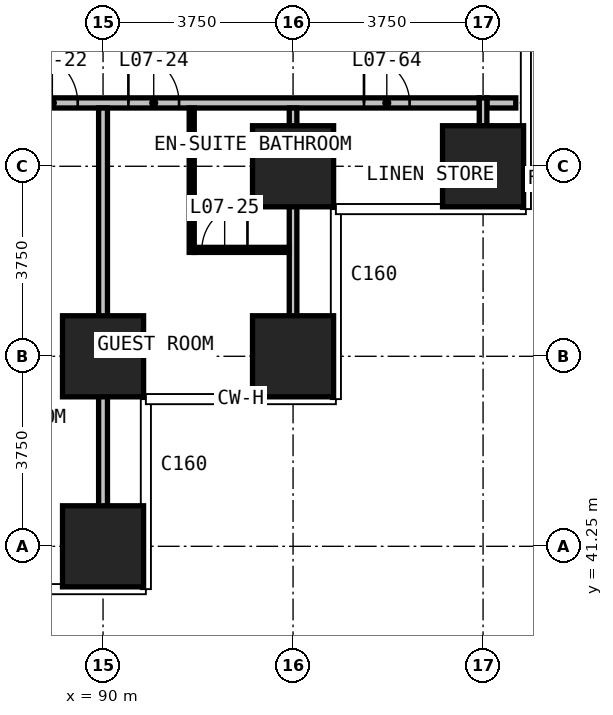
"""IFC4 building model, lengths in metres.
Left out: names, types, materials, properties, quantities, classifications, styles, units other than length and angle.
Written with IfcOpenShell. Run it as: python <this file> out.ifc"""

import sys

from ifc_helpers import new_model, si_unit, direction, frame, frame_2d, origin, origin_2d, place, context, subcontext, project, spatial, rectangle, extrude, element, fill, save


model = new_model("IFC4")
c1 = context("Model", 3, precision=1e-05, world=origin(), true_north=direction((0.0, 1.0)))
c2 = subcontext(c1, "Body", "Model", "MODEL_VIEW")
j1 = project(units=[si_unit("LENGTHUNIT", "METRE"), si_unit("PLANEANGLEUNIT", "RADIAN")], contexts=[c1])
p1 = place(None, origin())
s1 = spatial("IfcSite", under=j1, at=p1, CompositionType="ELEMENT")
p2 = place(p1, origin())
s2 = spatial("IfcBuilding", under=s1, at=p2, CompositionType="ELEMENT")
p3 = place(p2, frame((0.0, 0.0, 42.8)))
s3 = spatial("IfcBuildingStorey", under=s2, at=p3, CompositionType="ELEMENT", Elevation=42.8)
for number, where, z_axis, x_axis in (
    (1, (90.0, 41.25, 0.0), (0.0, 0.0, 1.0), (1.0, 0.0, 0.0)),
    (2, (90.0, 45.0, 0.0), (0.0, 0.0, 1.0), (1.0, 0.0, 0.0)),
    (3, (93.75, 45.0, 0.0), (0.0, 0.0, 1.0), (1.0, 0.0, 0.0)),
    (4, (93.75, 48.75, 0.0), (0.0, 0.0, 1.0), (1.0, 0.0, 0.0)),
    (5, (97.5, 48.75, 0.0), (0.0, 0.0, 1.0), (1.0, 0.0, 0.0)),
):
    element("IfcColumn", number, at=place(p3, frame(where, z_axis=z_axis, x_axis=x_axis)), inside=s3, PredefinedType="COLUMN", context=c2, shape_type="SweptSolid", body=[
        extrude(rectangle(XDim=1.6, YDim=1.6, at=origin_2d()), origin(), (0.0, 0.0, 1.0), 3.3),
    ])
p4 = place(p3, frame((52.575, 50.0, 0.0), z_axis=(0.0, 0.0, 1.0), x_axis=(1.0, 0.0, 0.0)))
e6 = element("IfcWall", 6, at=p4, inside=s3, PredefinedType="PARTITIONING", context=c2, shape_type="SweptSolid", body=[
    extrude(rectangle(XDim=44.85, YDim=0.2, at=frame_2d((22.425, 0.0))), origin(), (0.0, 0.0, 1.0), 3.0),
])
p5 = place(p4, frame((5.925, 0.0, 0.0)))
e7 = element("IfcOpeningElement", 7, at=p5, cuts=e6, PredefinedType="OPENING", context=c2, shape_type="SweptSolid", body=[
    extrude(rectangle(XDim=1.0, YDim=2.2, at=frame_2d((0.5, 1.1))), frame((0.0, 0.11, 0.0), z_axis=(0.0, -1.0, 0.0), x_axis=(1.0, 0.0, 0.0)), (0.0, 0.0, 1.0), 0.22),
])
p6 = place(p4, frame((7.925, 0.0, 0.0)))
e8 = element("IfcOpeningElement", 8, at=p6, cuts=e6, PredefinedType="OPENING", context=c2, shape_type="SweptSolid", body=[
    extrude(rectangle(XDim=1.0, YDim=2.2, at=frame_2d((0.5, 1.1))), frame((0.0, 0.11, 0.0), z_axis=(0.0, -1.0, 0.0), x_axis=(1.0, 0.0, 0.0)), (0.0, 0.0, 1.0), 0.22),
])
p7 = place(p4, frame((13.425, 0.0, 0.0)))
e9 = element("IfcOpeningElement", 9, at=p7, cuts=e6, PredefinedType="OPENING", context=c2, shape_type="SweptSolid", body=[
    extrude(rectangle(XDim=1.0, YDim=2.2, at=frame_2d((0.5, 1.1))), frame((0.0, 0.11, 0.0), z_axis=(0.0, -1.0, 0.0), x_axis=(1.0, 0.0, 0.0)), (0.0, 0.0, 1.0), 0.22),
])
p8 = place(p4, frame((15.425, 0.0, 0.0)))
e10 = element("IfcOpeningElement", 10, at=p8, cuts=e6, PredefinedType="OPENING", context=c2, shape_type="SweptSolid", body=[
    extrude(rectangle(XDim=1.0, YDim=2.2, at=frame_2d((0.5, 1.1))), frame((0.0, 0.11, 0.0), z_axis=(0.0, -1.0, 0.0), x_axis=(1.0, 0.0, 0.0)), (0.0, 0.0, 1.0), 0.22),
])
p9 = place(p4, frame((20.925, 0.0, 0.0)))
e11 = element("IfcOpeningElement", 11, at=p9, cuts=e6, PredefinedType="OPENING", context=c2, shape_type="SweptSolid", body=[
    extrude(rectangle(XDim=1.0, YDim=2.2, at=frame_2d((0.5, 1.1))), frame((0.0, 0.11, 0.0), z_axis=(0.0, -1.0, 0.0), x_axis=(1.0, 0.0, 0.0)), (0.0, 0.0, 1.0), 0.22),
])
p10 = place(p4, frame((22.925, 0.0, 0.0)))
e12 = element("IfcOpeningElement", 12, at=p10, cuts=e6, PredefinedType="OPENING", context=c2, shape_type="SweptSolid", body=[
    extrude(rectangle(XDim=1.0, YDim=2.2, at=frame_2d((0.5, 1.1))), frame((0.0, 0.11, 0.0), z_axis=(0.0, -1.0, 0.0), x_axis=(1.0, 0.0, 0.0)), (0.0, 0.0, 1.0), 0.22),
])
p11 = place(p4, frame((28.425, 0.0, 0.0)))
e13 = element("IfcOpeningElement", 13, at=p11, cuts=e6, PredefinedType="OPENING", context=c2, shape_type="SweptSolid", body=[
    extrude(rectangle(XDim=1.0, YDim=2.2, at=frame_2d((0.5, 1.1))), frame((0.0, 0.11, 0.0), z_axis=(0.0, -1.0, 0.0), x_axis=(1.0, 0.0, 0.0)), (0.0, 0.0, 1.0), 0.22),
])
p12 = place(p4, frame((30.425, 0.0, 0.0)))
e14 = element("IfcOpeningElement", 14, at=p12, cuts=e6, PredefinedType="OPENING", context=c2, shape_type="SweptSolid", body=[
    extrude(rectangle(XDim=1.0, YDim=2.2, at=frame_2d((0.5, 1.1))), frame((0.0, 0.11, 0.0), z_axis=(0.0, -1.0, 0.0), x_axis=(1.0, 0.0, 0.0)), (0.0, 0.0, 1.0), 0.22),
])
p13 = place(p4, frame((35.925, 0.0, 0.0)))
e15 = element("IfcOpeningElement", 15, at=p13, cuts=e6, PredefinedType="OPENING", context=c2, shape_type="SweptSolid", body=[
    extrude(rectangle(XDim=1.0, YDim=2.2, at=frame_2d((0.5, 1.1))), frame((0.0, 0.11, 0.0), z_axis=(0.0, -1.0, 0.0), x_axis=(1.0, 0.0, 0.0)), (0.0, 0.0, 1.0), 0.22),
])
p14 = place(p4, frame((37.925, 0.0, 0.0)))
e16 = element("IfcOpeningElement", 16, at=p14, cuts=e6, PredefinedType="OPENING", context=c2, shape_type="SweptSolid", body=[
    extrude(rectangle(XDim=1.0, YDim=2.2, at=frame_2d((0.5, 1.1))), frame((0.0, 0.11, 0.0), z_axis=(0.0, -1.0, 0.0), x_axis=(1.0, 0.0, 0.0)), (0.0, 0.0, 1.0), 0.22),
])
p15 = place(p4, frame((1.4, 0.0, 0.0)))
e17 = element("IfcOpeningElement", 17, at=p15, cuts=e6, PredefinedType="OPENING", context=c2, shape_type="SweptSolid", body=[
    extrude(rectangle(XDim=0.9, YDim=2.2, at=frame_2d((0.45, 1.1))), frame((0.0, 0.11, 0.0), z_axis=(0.0, -1.0, 0.0), x_axis=(1.0, 0.0, 0.0)), (0.0, 0.0, 1.0), 0.22),
])
p16 = place(p4, frame((42.575, 0.0, 0.0)))
e18 = element("IfcOpeningElement", 18, at=p16, cuts=e6, PredefinedType="OPENING", context=c2, shape_type="SweptSolid", body=[
    extrude(rectangle(XDim=0.9, YDim=2.2, at=frame_2d((0.45, 1.1))), frame((0.0, 0.11, 0.0), z_axis=(0.0, -1.0, 0.0), x_axis=(1.0, 0.0, 0.0)), (0.0, 0.0, 1.0), 0.22),
])
p17 = place(p3, frame((97.575, 50.0, 0.0), z_axis=(0.0, 0.0, 1.0), x_axis=(1.0, 0.0, 0.0)))
e19 = element("IfcWall", 19, at=p17, inside=s3, PredefinedType="PARTITIONING", context=c2, shape_type="SweptSolid", body=[
    extrude(rectangle(XDim=0.57, YDim=0.2, at=frame_2d((0.285, 0.0))), origin(), (0.0, 0.0, 1.0), 3.0),
])
p18 = place(p3, frame((90.0, 40.485, 0.0), z_axis=(0.0, 0.0, 1.0), x_axis=(0.0, 1.0, 0.0)))
e20 = element("IfcWall", 20, at=p18, inside=s3, PredefinedType="PARTITIONING", context=c2, shape_type="SweptSolid", body=[
    extrude(rectangle(XDim=9.415, YDim=0.175, at=frame_2d((4.708, 0.0))), origin(), (0.0, 0.0, 1.0), 3.0),
])
p19 = place(p3, frame((93.75, 44.235, 0.0), z_axis=(0.0, 0.0, 1.0), x_axis=(0.0, 1.0, 0.0)))
e21 = element("IfcWall", 21, at=p19, inside=s3, PredefinedType="PARTITIONING", context=c2, shape_type="SweptSolid", body=[
    extrude(rectangle(XDim=5.665, YDim=0.15, at=frame_2d((2.833, 0.0))), origin(), (0.0, 0.0, 1.0), 3.0),
])
p20 = place(p3, frame((97.5, 48.105, 0.0), z_axis=(0.0, 0.0, 1.0), x_axis=(0.0, 1.0, 0.0)))
e22 = element("IfcWall", 22, at=p20, inside=s3, PredefinedType="PARTITIONING", context=c2, shape_type="SweptSolid", body=[
    extrude(rectangle(XDim=1.995, YDim=0.15, at=frame_2d((0.998, 0.0))), origin(), (0.0, 0.0, 1.0), 3.0),
])
p21 = place(p3, frame((91.8, 47.1, 0.0), z_axis=(0.0, 0.0, 1.0), x_axis=(1.0, 0.0, 0.0)))
e23 = element("IfcWall", 23, at=p21, inside=s3, PredefinedType="PARTITIONING", context=c2, shape_type="SweptSolid", body=[
    extrude(rectangle(XDim=1.875, YDim=0.1, at=frame_2d((0.938, 0.0))), origin(), (0.0, 0.0, 1.0), 3.0),
])
p22 = place(p21, frame((0.15, 0.0, 0.0)))
e24 = element("IfcOpeningElement", 24, at=p22, cuts=e23, PredefinedType="OPENING", context=c2, shape_type="SweptSolid", body=[
    extrude(rectangle(XDim=0.9, YDim=2.2, at=frame_2d((0.45, 1.1))), frame((0.0, 0.06, 0.0), z_axis=(0.0, -1.0, 0.0), x_axis=(1.0, 0.0, 0.0)), (0.0, 0.0, 1.0), 0.12),
])
p23 = place(p3, frame((91.75, 47.05, 0.0), z_axis=(0.0, 0.0, 1.0), x_axis=(0.0, 1.0, 0.0)))
e25 = element("IfcWall", 25, at=p23, inside=s3, PredefinedType="PARTITIONING", context=c2, shape_type="SweptSolid", body=[
    extrude(rectangle(XDim=2.85, YDim=0.1, at=frame_2d((1.425, 0.0))), origin(), (0.0, 0.0, 1.0), 3.0),
])
p24 = place(p13, origin())
e26 = element("IfcDoor", 26, at=p24, inside=s3, OperationType="SINGLE_SWING_LEFT", PredefinedType="DOOR", context=c2, shape_type="SweptSolid", body=[
    extrude(rectangle(XDim=1.0, YDim=2.2, at=frame_2d((0.5, 1.1))), frame((0.0, 0.025, 0.0), z_axis=(0.0, -1.0, 0.0), x_axis=(1.0, 0.0, 0.0)), (0.0, 0.0, 1.0), 0.05),
])
fill(e15, e26)
p25 = place(p14, origin())
e27 = element("IfcDoor", 27, at=p25, inside=s3, OperationType="SINGLE_SWING_LEFT", PredefinedType="DOOR", context=c2, shape_type="SweptSolid", body=[
    extrude(rectangle(XDim=1.0, YDim=2.2, at=frame_2d((0.5, 1.1))), frame((0.0, 0.025, 0.0), z_axis=(0.0, -1.0, 0.0), x_axis=(1.0, 0.0, 0.0)), (0.0, 0.0, 1.0), 0.05),
])
fill(e16, e27)
p26 = place(p22, origin())
e28 = element("IfcDoor", 28, at=p26, inside=s3, OperationType="SINGLE_SWING_RIGHT", PredefinedType="DOOR", context=c2, shape_type="SweptSolid", body=[
    extrude(rectangle(XDim=0.9, YDim=2.2, at=frame_2d((0.45, 1.1))), frame((0.0, 0.025, 0.0), z_axis=(0.0, -1.0, 0.0), x_axis=(1.0, 0.0, 0.0)), (0.0, 0.0, 1.0), 0.05),
])
fill(e24, e28)
p27 = place(p16, origin())
e29 = element("IfcDoor", 29, at=p27, inside=s3, OperationType="SINGLE_SWING_LEFT", PredefinedType="DOOR", context=c2, shape_type="SweptSolid", body=[
    extrude(rectangle(XDim=0.9, YDim=2.2, at=frame_2d((0.45, 1.1))), frame((0.0, 0.025, 0.0), z_axis=(0.0, -1.0, 0.0), x_axis=(1.0, 0.0, 0.0)), (0.0, 0.0, 1.0), 0.05),
])
fill(e18, e29)
save(model, sys.argv[1])
